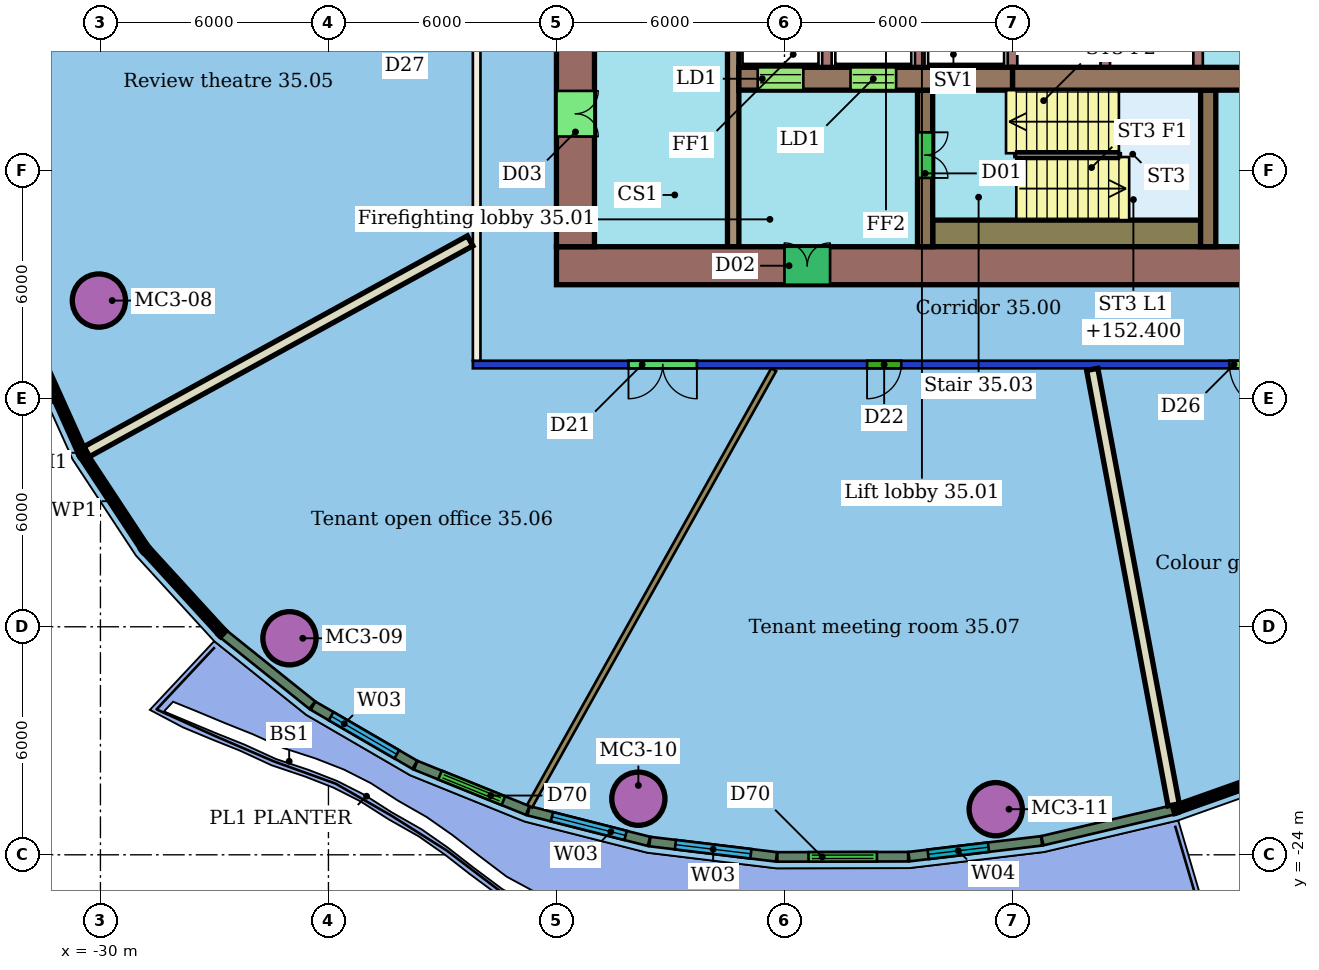
"""IFC4 building model, lengths in metres.
Left out: names, types, materials, properties, quantities, classifications, styles, units other than length and angle.
Written with IfcOpenShell. Run it as: python <this file> out.ifc"""

import sys

from ifc_helpers import new_model, si_unit, direction, frame, frame_2d, origin, origin_2d, place, context, subcontext, project, spatial, rectangle, hollow_circle, extrude, element, fill, save


model = new_model("IFC4")
c1 = context("Model", 3, precision=1e-05, world=origin(), true_north=direction((0.0, 1.0)))
c2 = subcontext(c1, "Body", "Model", "MODEL_VIEW")
j1 = project(units=[si_unit("LENGTHUNIT", "METRE"), si_unit("PLANEANGLEUNIT", "RADIAN")], contexts=[c1])
p1 = place(None, origin())
s1 = spatial("IfcSite", under=j1, at=p1, CompositionType="ELEMENT")
p2 = place(p1, origin())
s2 = spatial("IfcBuilding", under=s1, at=p2, CompositionType="ELEMENT")
p3 = place(p2, frame((0.0, 0.0, 150.6)))
s3 = spatial("IfcBuildingStorey", under=s2, at=p3, CompositionType="ELEMENT", Elevation=150.6)
for number, where, z_axis, x_axis in (
    (1, (-30.041, -9.417, 0.0), (0.0, 0.0, 1.0), (1.0, 0.0, 0.0)),
    (2, (-25.026, -18.303, 0.0), (0.0, 0.0, 1.0), (1.0, 0.0, 0.0)),
    (3, (-15.845, -22.524, 0.0), (0.0, 0.0, 1.0), (1.0, 0.0, 0.0)),
    (4, (-6.442, -22.8, 0.0), (0.0, 0.0, 1.0), (1.0, 0.0, 0.0)),
):
    element("IfcColumn", number, at=place(p3, frame(where, z_axis=z_axis, x_axis=x_axis)), inside=s3, PredefinedType="COLUMN", context=c2, shape_type="SweptSolid", body=[
        extrude(hollow_circle(Radius=0.7, WallThickness=0.05, at=origin_2d()), origin(), (0.0, 0.0, 1.0), 3.45),
    ])
p4 = place(p3, frame((8.2, -11.1, 0.0), z_axis=(0.0, 0.0, 1.0), x_axis=(-1.0, 0.0, 0.0)))
e5 = element("IfcWall", 5, at=p4, inside=s3, PredefinedType="PARTITIONING", context=c2, shape_type="SweptSolid", body=[
    extrude(rectangle(XDim=28.4, YDim=0.2, at=frame_2d((14.2, 0.0))), origin(), (0.0, 0.0, 1.0), 3.05),
])
p5 = place(p4, frame((22.505, 0.0, 0.0)))
e6 = element("IfcOpeningElement", 6, at=p5, cuts=e5, PredefinedType="OPENING", context=c2, shape_type="SweptSolid", body=[
    extrude(rectangle(XDim=1.8, YDim=2.1, at=frame_2d((0.9, 1.05))), frame((0.0, 0.11, 0.0), z_axis=(0.0, -1.0, 0.0), x_axis=(1.0, 0.0, 0.0)), (0.0, 0.0, 1.0), 0.22),
])
p6 = place(p4, frame((17.127, 0.0, 0.0)))
e7 = element("IfcOpeningElement", 7, at=p6, cuts=e5, PredefinedType="OPENING", context=c2, shape_type="SweptSolid", body=[
    extrude(rectangle(XDim=0.9, YDim=2.1, at=frame_2d((0.45, 1.05))), frame((0.0, 0.11, 0.0), z_axis=(0.0, -1.0, 0.0), x_axis=(1.0, 0.0, 0.0)), (0.0, 0.0, 1.0), 0.22),
])
p7 = place(p4, frame((7.291, 0.0, 0.0)))
e8 = element("IfcOpeningElement", 8, at=p7, cuts=e5, PredefinedType="OPENING", context=c2, shape_type="SweptSolid", body=[
    extrude(rectangle(XDim=1.2, YDim=2.1, at=frame_2d((0.6, 1.05))), frame((0.0, 0.11, 0.0), z_axis=(0.0, -1.0, 0.0), x_axis=(1.0, 0.0, 0.0)), (0.0, 0.0, 1.0), 0.22),
])
p8 = place(p3, frame((-20.1, -11.0, 0.0), z_axis=(0.0, 0.0, 1.0), x_axis=(0.0, 1.0, 0.0)))
e9 = element("IfcWall", 9, at=p8, inside=s3, PredefinedType="PARTITIONING", context=c2, shape_type="SweptSolid", body=[
    extrude(rectangle(XDim=22.0, YDim=0.2, at=frame_2d((11.0, 0.0))), origin(), (0.0, 0.0, 1.0), 3.45),
])
p9 = place(p8, frame((16.014, 0.0, 0.0)))
e10 = element("IfcOpeningElement", 10, at=p9, cuts=e9, PredefinedType="OPENING", context=c2, shape_type="SweptSolid", body=[
    extrude(rectangle(XDim=1.2, YDim=2.1, at=frame_2d((0.6, 1.05))), frame((0.0, 0.11, 0.0), z_axis=(0.0, -1.0, 0.0), x_axis=(1.0, 0.0, 0.0)), (0.0, 0.0, 1.0), 0.22),
])
p10 = place(p8, frame((9.012, 0.0, 0.0)))
e11 = element("IfcOpeningElement", 11, at=p10, cuts=e9, PredefinedType="OPENING", context=c2, shape_type="SweptSolid", body=[
    extrude(rectangle(XDim=1.8, YDim=2.4, at=frame_2d((0.9, 1.2))), frame((0.0, 0.11, 0.0), z_axis=(0.0, -1.0, 0.0), x_axis=(1.0, 0.0, 0.0)), (0.0, 0.0, 1.0), 0.22),
])
p11 = place(p3, frame((-30.359, -13.392, 0.0), z_axis=(0.0, 0.0, 1.0), x_axis=(0.876308586889, 0.481750205547, 0.0)))
e12 = element("IfcWall", 12, at=p11, inside=s3, PredefinedType="PARTITIONING", context=c2, shape_type="SweptSolid", body=[
    extrude(rectangle(XDim=11.511, YDim=0.3, at=frame_2d((5.755, 0.0))), origin(), (0.0, 0.0, 1.0), 3.45),
])
p12 = place(p3, frame((-18.707, -22.72, 0.0), z_axis=(0.0, 0.0, 1.0), x_axis=(0.488112856121, 0.872780522061, 0.0)))
e13 = element("IfcWall", 13, at=p12, inside=s3, PredefinedType="PARTITIONING", context=c2, shape_type="SweptSolid", body=[
    extrude(rectangle(XDim=13.157, YDim=0.15, at=frame_2d((6.579, 0.0))), origin(), (0.0, 0.0, 1.0), 3.45),
])
p13 = place(p3, frame((-1.759, -22.687, 0.0), z_axis=(0.0, 0.0, 1.0), x_axis=(-0.183744806011, 0.982973980461, 0.0)))
e14 = element("IfcWall", 14, at=p13, inside=s3, PredefinedType="PARTITIONING", context=c2, shape_type="SweptSolid", body=[
    extrude(rectangle(XDim=11.658, YDim=0.3, at=frame_2d((5.829, 0.0))), origin(), (0.0, 0.0, 1.0), 3.45),
])
p14 = place(p3, frame((-26.758, -18.194, 0.0), z_axis=(0.0, 0.0, 1.0), x_axis=(0.780485864534, -0.625173428148, 0.0)))
e15 = element("IfcWall", 15, at=p14, inside=s3, PredefinedType="SOLIDWALL", context=c2, shape_type="SweptSolid", body=[
    extrude(rectangle(XDim=2.987, YDim=0.25, at=frame_2d((1.493, 0.0))), origin(), (0.0, 0.0, 1.0), 3.1),
])
p15 = place(p3, frame((-24.405, -20.076, 0.0), z_axis=(0.0, 0.0, 1.0), x_axis=(0.864615512978, -0.502434089925, 0.0)))
e16 = element("IfcWall", 16, at=p15, inside=s3, PredefinedType="SOLIDWALL", context=c2, shape_type="SweptSolid", body=[
    extrude(rectangle(XDim=3.097, YDim=0.25, at=frame_2d((1.548, 0.0))), origin(), (0.0, 0.0, 1.0), 3.1),
])
p16 = place(p15, frame((0.548, 0.0, 0.9)))
e17 = element("IfcOpeningElement", 17, at=p16, cuts=e16, PredefinedType="OPENING", context=c2, shape_type="SweptSolid", body=[
    extrude(rectangle(XDim=2.0, YDim=2.1, at=frame_2d((1.0, 1.05))), frame((0.0, 0.135, 0.0), z_axis=(0.0, -1.0, 0.0), x_axis=(1.0, 0.0, 0.0)), (0.0, 0.0, 1.0), 0.27),
])
p17 = place(p3, frame((-21.704, -21.643, 0.0), z_axis=(0.0, 0.0, 1.0), x_axis=(0.927146406079, -0.374699268339, 0.0)))
e18 = element("IfcWall", 18, at=p17, inside=s3, PredefinedType="SOLIDWALL", context=c2, shape_type="SweptSolid", body=[
    extrude(rectangle(XDim=3.178, YDim=0.25, at=frame_2d((1.589, 0.0))), origin(), (0.0, 0.0, 1.0), 3.1),
])
p18 = place(p17, frame((0.689, 0.0, 0.0)))
e19 = element("IfcOpeningElement", 19, at=p18, cuts=e18, PredefinedType="OPENING", context=c2, shape_type="SweptSolid", body=[
    extrude(rectangle(XDim=1.8, YDim=2.4, at=frame_2d((0.9, 1.2))), frame((0.0, 0.135, 0.0), z_axis=(0.0, -1.0, 0.0), x_axis=(1.0, 0.0, 0.0)), (0.0, 0.0, 1.0), 0.27),
])
p19 = place(p3, frame((-18.733, -22.842, 0.0), z_axis=(0.0, 0.0, 1.0), x_axis=(0.969199069112, -0.246278631701, 0.0)))
e20 = element("IfcWall", 20, at=p19, inside=s3, PredefinedType="SOLIDWALL", context=c2, shape_type="SweptSolid", body=[
    extrude(rectangle(XDim=3.267, YDim=0.25, at=frame_2d((1.634, 0.0))), origin(), (0.0, 0.0, 1.0), 3.1),
])
p20 = place(p19, frame((0.634, 0.0, 0.9)))
e21 = element("IfcOpeningElement", 21, at=p20, cuts=e20, PredefinedType="OPENING", context=c2, shape_type="SweptSolid", body=[
    extrude(rectangle(XDim=2.0, YDim=2.1, at=frame_2d((1.0, 1.05))), frame((0.0, 0.135, 0.0), z_axis=(0.0, -1.0, 0.0), x_axis=(1.0, 0.0, 0.0)), (0.0, 0.0, 1.0), 0.27),
])
p21 = place(p3, frame((-15.543, -23.651, 0.0), z_axis=(0.0, 0.0, 1.0), x_axis=(0.992754830244, -0.120157592466, 0.0)))
e22 = element("IfcWall", 22, at=p21, inside=s3, PredefinedType="SOLIDWALL", context=c2, shape_type="SweptSolid", body=[
    extrude(rectangle(XDim=3.357, YDim=0.25, at=frame_2d((1.678, 0.0))), origin(), (0.0, 0.0, 1.0), 3.1),
])
p22 = place(p21, frame((0.678, 0.0, 0.9)))
e23 = element("IfcOpeningElement", 23, at=p22, cuts=e22, PredefinedType="OPENING", context=c2, shape_type="SweptSolid", body=[
    extrude(rectangle(XDim=2.0, YDim=2.1, at=frame_2d((1.0, 1.05))), frame((0.0, 0.135, 0.0), z_axis=(0.0, -1.0, 0.0), x_axis=(1.0, 0.0, 0.0)), (0.0, 0.0, 1.0), 0.27),
])
p23 = place(p3, frame((-12.187, -24.056, 0.0), z_axis=(0.0, 0.0, 1.0), x_axis=(0.999998549944, 0.001702970638, 0.0)))
e24 = element("IfcWall", 24, at=p23, inside=s3, PredefinedType="SOLIDWALL", context=c2, shape_type="SweptSolid", body=[
    extrude(rectangle(XDim=3.441, YDim=0.25, at=frame_2d((1.72, 0.0))), origin(), (0.0, 0.0, 1.0), 3.1),
])
p24 = place(p23, frame((0.82, 0.0, 0.0)))
e25 = element("IfcOpeningElement", 25, at=p24, cuts=e24, PredefinedType="OPENING", context=c2, shape_type="SweptSolid", body=[
    extrude(rectangle(XDim=1.8, YDim=2.4, at=frame_2d((0.9, 1.2))), frame((0.0, 0.135, 0.0), z_axis=(0.0, -1.0, 0.0), x_axis=(1.0, 0.0, 0.0)), (0.0, 0.0, 1.0), 0.27),
])
p25 = place(p3, frame((-8.724, -24.049, 0.0), z_axis=(0.0, 0.0, 1.0), x_axis=(0.992969234445, 0.11837271411, 0.0)))
e26 = element("IfcWall", 26, at=p25, inside=s3, PredefinedType="SOLIDWALL", context=c2, shape_type="SweptSolid", body=[
    extrude(rectangle(XDim=3.514, YDim=0.25, at=frame_2d((1.757, 0.0))), origin(), (0.0, 0.0, 1.0), 3.1),
])
p26 = place(p25, frame((0.507, 0.0, 0.9)))
e27 = element("IfcOpeningElement", 27, at=p26, cuts=e26, PredefinedType="OPENING", context=c2, shape_type="SweptSolid", body=[
    extrude(rectangle(XDim=1.6, YDim=2.1, at=frame_2d((0.8, 1.05))), frame((0.0, 0.135, 0.0), z_axis=(0.0, -1.0, 0.0), x_axis=(1.0, 0.0, 0.0)), (0.0, 0.0, 1.0), 0.27),
])
p27 = place(p3, frame((-5.213, -23.629, 0.0), z_axis=(0.0, 0.0, 1.0), x_axis=(0.973349080419, 0.229328514683, 0.0)))
e28 = element("IfcWall", 28, at=p27, inside=s3, PredefinedType="SOLIDWALL", context=c2, shape_type="SweptSolid", body=[
    extrude(rectangle(XDim=3.529, YDim=0.25, at=frame_2d((1.765, 0.0))), origin(), (0.0, 0.0, 1.0), 3.1),
])
p28 = place(p3, frame((-18.0, -8.5, 0.0), z_axis=(0.0, 0.0, 1.0), x_axis=(1.0, 0.0, 0.0)))
e29 = element("IfcWall", 29, at=p28, inside=s3, PredefinedType="SHEAR", context=c2, shape_type="SweptSolid", body=[
    extrude(rectangle(XDim=24.0, YDim=1.0, at=frame_2d((12.0, 0.0))), origin(), (0.0, 0.0, 1.0), 3.3),
])
p29 = place(p28, frame((6.0, 0.0, 0.0)))
e30 = element("IfcOpeningElement", 30, at=p29, cuts=e29, PredefinedType="OPENING", context=c2, shape_type="SweptSolid", body=[
    extrude(rectangle(XDim=1.2, YDim=2.1, at=frame_2d((0.6, 1.05))), frame((0.0, 0.51, 0.0), z_axis=(0.0, -1.0, 0.0), x_axis=(1.0, 0.0, 0.0)), (0.0, 0.0, 1.0), 1.02),
])
p30 = place(p3, frame((-17.5, 8.0, 0.0), z_axis=(0.0, 0.0, 1.0), x_axis=(0.0, -1.0, 0.0)))
e31 = element("IfcWall", 31, at=p30, inside=s3, PredefinedType="SHEAR", context=c2, shape_type="SweptSolid", body=[
    extrude(rectangle(XDim=16.0, YDim=1.0, at=frame_2d((8.0, 0.0))), origin(), (0.0, 0.0, 1.0), 3.3),
])
p31 = place(p30, frame((11.9, 0.0, 0.0)))
e32 = element("IfcOpeningElement", 32, at=p31, cuts=e31, PredefinedType="OPENING", context=c2, shape_type="SweptSolid", body=[
    extrude(rectangle(XDim=1.2, YDim=2.1, at=frame_2d((0.6, 1.05))), frame((0.0, 0.51, 0.0), z_axis=(0.0, -1.0, 0.0), x_axis=(1.0, 0.0, 0.0)), (0.0, 0.0, 1.0), 1.02),
])
p32 = place(p30, frame((2.9, 0.0, 0.0)))
e33 = element("IfcOpeningElement", 33, at=p32, cuts=e31, PredefinedType="OPENING", context=c2, shape_type="SweptSolid", body=[
    extrude(rectangle(XDim=1.2, YDim=2.1, at=frame_2d((0.6, 1.05))), frame((0.0, 0.51, 0.0), z_axis=(0.0, -1.0, 0.0), x_axis=(1.0, 0.0, 0.0)), (0.0, 0.0, 1.0), 1.02),
])
p33 = place(p3, frame((-13.2, -3.58, 0.0), z_axis=(0.0, 0.0, 1.0), x_axis=(1.0, 0.0, 0.0)))
e34 = element("IfcWall", 34, at=p33, inside=s3, PredefinedType="SHEAR", context=c2, shape_type="SweptSolid", body=[
    extrude(rectangle(XDim=7.2, YDim=0.6, at=frame_2d((3.6, 0.0))), origin(), (0.0, 0.0, 1.0), 3.3),
])
p34 = place(p33, frame((0.496, 0.0, 0.0)))
e35 = element("IfcOpeningElement", 35, at=p34, cuts=e34, PredefinedType="OPENING", context=c2, shape_type="SweptSolid", body=[
    extrude(rectangle(XDim=1.2, YDim=2.1, at=frame_2d((0.6, 1.05))), frame((0.0, 0.31, 0.0), z_axis=(0.0, -1.0, 0.0), x_axis=(1.0, 0.0, 0.0)), (0.0, 0.0, 1.0), 0.62),
])
p35 = place(p33, frame((2.938, 0.0, 0.0)))
e36 = element("IfcOpeningElement", 36, at=p35, cuts=e34, PredefinedType="OPENING", context=c2, shape_type="SweptSolid", body=[
    extrude(rectangle(XDim=1.2, YDim=2.1, at=frame_2d((0.6, 1.05))), frame((0.0, 0.31, 0.0), z_axis=(0.0, -1.0, 0.0), x_axis=(1.0, 0.0, 0.0)), (0.0, 0.0, 1.0), 0.62),
])
p36 = place(p3, frame((-6.0, -3.58, 0.0), z_axis=(0.0, 0.0, 1.0), x_axis=(1.0, 0.0, 0.0)))
e37 = element("IfcWall", 37, at=p36, inside=s3, PredefinedType="SHEAR", context=c2, shape_type="SweptSolid", body=[
    extrude(rectangle(XDim=7.2, YDim=0.6, at=frame_2d((3.6, 0.0))), origin(), (0.0, 0.0, 1.0), 3.3),
])
p37 = place(p3, frame((-13.35, 8.0, 0.0), z_axis=(0.0, 0.0, 1.0), x_axis=(0.0, -1.0, 0.0)))
e38 = element("IfcWall", 38, at=p37, inside=s3, PredefinedType="SHEAR", context=c2, shape_type="SweptSolid", body=[
    extrude(rectangle(XDim=16.0, YDim=0.3, at=frame_2d((8.0, 0.0))), origin(), (0.0, 0.0, 1.0), 3.3),
])
p38 = place(p37, frame((7.25, 0.0, 0.0)))
e39 = element("IfcOpeningElement", 39, at=p38, cuts=e38, PredefinedType="OPENING", context=c2, shape_type="SweptSolid", body=[
    extrude(rectangle(XDim=1.5, YDim=2.1, at=frame_2d((0.75, 1.05))), frame((0.0, 0.16, 0.0), z_axis=(0.0, -1.0, 0.0), x_axis=(1.0, 0.0, 0.0)), (0.0, 0.0, 1.0), 0.32),
])
p39 = place(p3, frame((-8.3, -3.88, 0.0), z_axis=(0.0, 0.0, 1.0), x_axis=(0.0, -1.0, 0.0)))
e40 = element("IfcWall", 40, at=p39, inside=s3, PredefinedType="SHEAR", context=c2, shape_type="SweptSolid", body=[
    extrude(rectangle(XDim=4.12, YDim=0.4, at=frame_2d((2.06, 0.0))), origin(), (0.0, 0.0, 1.0), 3.3),
])
p40 = place(p39, frame((1.11, 0.0, 0.0)))
e41 = element("IfcOpeningElement", 41, at=p40, cuts=e40, PredefinedType="OPENING", context=c2, shape_type="SweptSolid", body=[
    extrude(rectangle(XDim=1.2, YDim=2.1, at=frame_2d((0.6, 1.05))), frame((0.0, 0.21, 0.0), z_axis=(0.0, -1.0, 0.0), x_axis=(1.0, 0.0, 0.0)), (0.0, 0.0, 1.0), 0.42),
])
p41 = place(p3, frame((-0.85, -3.88, 0.0), z_axis=(0.0, 0.0, 1.0), x_axis=(0.0, -1.0, 0.0)))
e42 = element("IfcWall", 42, at=p41, inside=s3, PredefinedType="SHEAR", context=c2, shape_type="SweptSolid", body=[
    extrude(rectangle(XDim=4.12, YDim=0.4, at=frame_2d((2.06, 0.0))), origin(), (0.0, 0.0, 1.0), 3.3),
])
p42 = place(p3, frame((-8.1, -7.65, 0.0), z_axis=(0.0, 0.0, 1.0), x_axis=(1.0, 0.0, 0.0)))
e43 = element("IfcWall", 43, at=p42, inside=s3, PredefinedType="SHEAR", context=c2, shape_type="SweptSolid", body=[
    extrude(rectangle(XDim=7.05, YDim=0.7, at=frame_2d((3.525, 0.0))), origin(), (0.0, 0.0, 1.0), 3.3),
])
for number, where, z_axis, x_axis in (
    (44, (-10.883, -1.6, 0.0), (0.0, 0.0, 1.0), (0.0, -1.0, 0.0)),
    (45, (-8.442, -1.6, 0.0), (0.0, 0.0, 1.0), (0.0, -1.0, 0.0)),
    (46, (-6.0, -1.6, 0.0), (0.0, 0.0, 1.0), (0.0, -1.0, 0.0)),
    (47, (-3.558, -1.6, 0.0), (0.0, 0.0, 1.0), (0.0, -1.0, 0.0)),
    (48, (-1.117, -1.6, 0.0), (0.0, 0.0, 1.0), (0.0, -1.0, 0.0)),
):
    element("IfcWall", number, at=place(p3, frame(where, z_axis=z_axis, x_axis=x_axis)), inside=s3, PredefinedType="SHEAR", context=c2, shape_type="SweptSolid", body=[
        extrude(rectangle(XDim=1.68, YDim=0.25, at=frame_2d((0.84, 0.0))), origin(), (0.0, 0.0, 1.0), 3.3),
    ])
p43 = place(p5, origin())
e49 = element("IfcDoor", 49, at=p43, inside=s3, OperationType="DOUBLE_DOOR_SINGLE_SWING", PredefinedType="DOOR", context=c2, shape_type="SweptSolid", body=[
    extrude(rectangle(XDim=1.8, YDim=2.1, at=frame_2d((0.9, 1.05))), frame((0.0, 0.025, 0.0), z_axis=(0.0, -1.0, 0.0), x_axis=(1.0, 0.0, 0.0)), (0.0, 0.0, 1.0), 0.05),
])
fill(e6, e49)
p44 = place(p6, origin())
e50 = element("IfcDoor", 50, at=p44, inside=s3, OperationType="SINGLE_SWING_RIGHT", PredefinedType="DOOR", context=c2, shape_type="SweptSolid", body=[
    extrude(rectangle(XDim=0.9, YDim=2.1, at=frame_2d((0.45, 1.05))), frame((0.0, 0.025, 0.0), z_axis=(0.0, -1.0, 0.0), x_axis=(1.0, 0.0, 0.0)), (0.0, 0.0, 1.0), 0.05),
])
fill(e7, e50)
p45 = place(p7, origin())
e51 = element("IfcDoor", 51, at=p45, inside=s3, OperationType="SINGLE_SWING_LEFT", PredefinedType="DOOR", context=c2, shape_type="SweptSolid", body=[
    extrude(rectangle(XDim=1.2, YDim=2.1, at=frame_2d((0.6, 1.05))), frame((0.0, 0.025, 0.0), z_axis=(0.0, -1.0, 0.0), x_axis=(1.0, 0.0, 0.0)), (0.0, 0.0, 1.0), 0.05),
])
fill(e8, e51)
p46 = place(p16, origin())
e52 = element("IfcWindow", 52, at=p46, inside=s3, PartitioningType="SINGLE_PANEL", PredefinedType="WINDOW", context=c2, shape_type="SweptSolid", body=[
    extrude(rectangle(XDim=2.0, YDim=2.1, at=frame_2d((1.0, 1.05))), frame((0.0, 0.03, 0.0), z_axis=(0.0, -1.0, 0.0), x_axis=(1.0, 0.0, 0.0)), (0.0, 0.0, 1.0), 0.06),
])
fill(e17, e52)
p47 = place(p18, origin())
e53 = element("IfcDoor", 53, at=p47, inside=s3, OperationType="DOUBLE_DOOR_SLIDING", PredefinedType="DOOR", context=c2, shape_type="SweptSolid", body=[
    extrude(rectangle(XDim=1.8, YDim=2.4, at=frame_2d((0.9, 1.2))), frame((0.0, 0.025, 0.0), z_axis=(0.0, -1.0, 0.0), x_axis=(1.0, 0.0, 0.0)), (0.0, 0.0, 1.0), 0.05),
])
fill(e19, e53)
p48 = place(p20, origin())
e54 = element("IfcWindow", 54, at=p48, inside=s3, PartitioningType="SINGLE_PANEL", PredefinedType="WINDOW", context=c2, shape_type="SweptSolid", body=[
    extrude(rectangle(XDim=2.0, YDim=2.1, at=frame_2d((1.0, 1.05))), frame((0.0, 0.03, 0.0), z_axis=(0.0, -1.0, 0.0), x_axis=(1.0, 0.0, 0.0)), (0.0, 0.0, 1.0), 0.06),
])
fill(e21, e54)
p49 = place(p22, origin())
e55 = element("IfcWindow", 55, at=p49, inside=s3, PartitioningType="SINGLE_PANEL", PredefinedType="WINDOW", context=c2, shape_type="SweptSolid", body=[
    extrude(rectangle(XDim=2.0, YDim=2.1, at=frame_2d((1.0, 1.05))), frame((0.0, 0.03, 0.0), z_axis=(0.0, -1.0, 0.0), x_axis=(1.0, 0.0, 0.0)), (0.0, 0.0, 1.0), 0.06),
])
fill(e23, e55)
p50 = place(p24, origin())
e56 = element("IfcDoor", 56, at=p50, inside=s3, OperationType="DOUBLE_DOOR_SLIDING", PredefinedType="DOOR", context=c2, shape_type="SweptSolid", body=[
    extrude(rectangle(XDim=1.8, YDim=2.4, at=frame_2d((0.9, 1.2))), frame((0.0, 0.025, 0.0), z_axis=(0.0, -1.0, 0.0), x_axis=(1.0, 0.0, 0.0)), (0.0, 0.0, 1.0), 0.05),
])
fill(e25, e56)
p51 = place(p26, origin())
e57 = element("IfcWindow", 57, at=p51, inside=s3, PartitioningType="SINGLE_PANEL", PredefinedType="WINDOW", context=c2, shape_type="SweptSolid", body=[
    extrude(rectangle(XDim=1.6, YDim=2.1, at=frame_2d((0.8, 1.05))), frame((0.0, 0.03, 0.0), z_axis=(0.0, -1.0, 0.0), x_axis=(1.0, 0.0, 0.0)), (0.0, 0.0, 1.0), 0.06),
])
fill(e27, e57)
p52 = place(p29, origin())
e58 = element("IfcDoor", 58, at=p52, inside=s3, OperationType="DOUBLE_DOOR_SINGLE_SWING", PredefinedType="NOTDEFINED", context=c2, shape_type="SweptSolid", body=[
    extrude(rectangle(XDim=1.2, YDim=2.1, at=frame_2d((0.6, 1.05))), frame((0.0, 0.025, 0.0), z_axis=(0.0, -1.0, 0.0), x_axis=(1.0, 0.0, 0.0)), (0.0, 0.0, 1.0), 0.05),
])
fill(e30, e58)
p53 = place(p31, origin())
e59 = element("IfcDoor", 59, at=p53, inside=s3, OperationType="DOUBLE_DOOR_SINGLE_SWING", PredefinedType="NOTDEFINED", context=c2, shape_type="SweptSolid", body=[
    extrude(rectangle(XDim=1.2, YDim=2.1, at=frame_2d((0.6, 1.05))), frame((0.0, 0.025, 0.0), z_axis=(0.0, -1.0, 0.0), x_axis=(1.0, 0.0, 0.0)), (0.0, 0.0, 1.0), 0.05),
])
fill(e32, e59)
p54 = place(p34, origin())
e60 = element("IfcDoor", 60, at=p54, inside=s3, OperationType="DOUBLE_DOOR_SLIDING", PredefinedType="NOTDEFINED", context=c2, shape_type="SweptSolid", body=[
    extrude(rectangle(XDim=1.2, YDim=2.1, at=frame_2d((0.6, 1.05))), frame((0.0, 0.025, 0.0), z_axis=(0.0, -1.0, 0.0), x_axis=(1.0, 0.0, 0.0)), (0.0, 0.0, 1.0), 0.05),
])
fill(e35, e60)
p55 = place(p35, origin())
e61 = element("IfcDoor", 61, at=p55, inside=s3, OperationType="DOUBLE_DOOR_SLIDING", PredefinedType="NOTDEFINED", context=c2, shape_type="SweptSolid", body=[
    extrude(rectangle(XDim=1.2, YDim=2.1, at=frame_2d((0.6, 1.05))), frame((0.0, 0.025, 0.0), z_axis=(0.0, -1.0, 0.0), x_axis=(1.0, 0.0, 0.0)), (0.0, 0.0, 1.0), 0.05),
])
fill(e36, e61)
p56 = place(p40, origin())
e62 = element("IfcDoor", 62, at=p56, inside=s3, OperationType="DOUBLE_DOOR_SINGLE_SWING", PredefinedType="NOTDEFINED", context=c2, shape_type="SweptSolid", body=[
    extrude(rectangle(XDim=1.2, YDim=2.1, at=frame_2d((0.6, 1.05))), frame((0.0, 0.025, 0.0), z_axis=(0.0, -1.0, 0.0), x_axis=(1.0, 0.0, 0.0)), (0.0, 0.0, 1.0), 0.05),
])
fill(e41, e62)
save(model, sys.argv[1])
